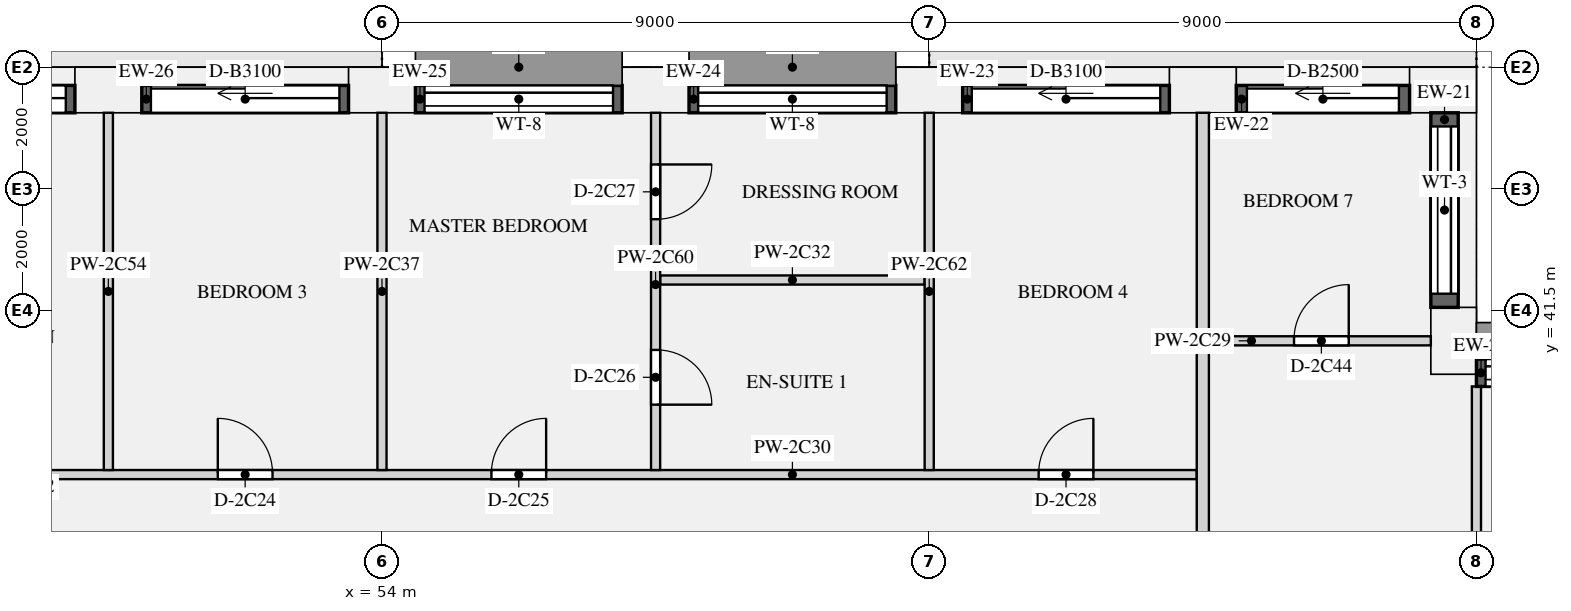
"""IFC4 building model, lengths in metres.
Left out: names, types, materials, properties, quantities, classifications, styles, units other than length and angle.
Written with IfcOpenShell. Run it as: python <this file> out.ifc"""

import sys

from ifc_helpers import new_model, si_unit, direction, frame, frame_2d, origin, origin_2d, place, context, subcontext, project, spatial, rectangle, extrude, element, fill, save


model = new_model("IFC4")
c1 = context("Model", 3, precision=1e-05, world=origin(), true_north=direction((0.0, 1.0)))
c2 = subcontext(c1, "Body", "Model", "MODEL_VIEW")
j1 = project(units=[si_unit("LENGTHUNIT", "METRE"), si_unit("PLANEANGLEUNIT", "RADIAN")], contexts=[c1])
p1 = place(None, origin())
s1 = spatial("IfcSite", under=j1, at=p1, CompositionType="ELEMENT")
p2 = place(p1, origin())
s2 = spatial("IfcBuilding", under=s1, at=p2, CompositionType="ELEMENT")
p3 = place(p2, frame((0.0, 0.0, 102.45)))
s3 = spatial("IfcBuildingStorey", under=s2, at=p3, CompositionType="ELEMENT", Elevation=102.45)
for number, where, z_axis, x_axis in (
    (1, (71.625, 41.0, 0.0), (0.0, 0.0, 1.0), (0.0, 1.0, 0.0)),
    (2, (71.45, 45.125, 0.0), (0.0, 0.0, 1.0), (-1.0, 0.0, 0.0)),
    (3, (67.5, 45.125, 0.0), (0.0, 0.0, 1.0), (-1.0, 0.0, 0.0)),
    (4, (63.0, 45.125, 0.0), (0.0, 0.0, 1.0), (-1.0, 0.0, 0.0)),
    (5, (58.5, 45.125, 0.0), (0.0, 0.0, 1.0), (-1.0, 0.0, 0.0)),
    (6, (54.0, 45.125, 0.0), (0.0, 0.0, 1.0), (-1.0, 0.0, 0.0)),
    (7, (49.5, 45.125, 0.0), (0.0, 0.0, 1.0), (-1.0, 0.0, 0.0)),
):
    element("IfcColumn", number, at=place(p3, frame(where, z_axis=z_axis, x_axis=x_axis)), inside=s3, PredefinedType="USERDEFINED", context=c2, shape_type="SweptSolid", body=[
        extrude(rectangle(XDim=1.1, YDim=0.75, at=origin_2d()), origin(), (0.0, 0.0, 1.0), 3.15),
    ])
p4 = place(p3, frame((75.4, 40.475, 0.9), z_axis=(0.0, 0.0, 1.0), x_axis=(-1.0, 0.0, 0.0)))
e8 = element("IfcWall", 8, at=p4, inside=s3, PredefinedType="SOLIDWALL", context=c2, shape_type="SweptSolid", body=[
    extrude(rectangle(XDim=3.4, YDim=0.45, at=frame_2d((1.7, 0.0))), origin(), (0.0, 0.0, 1.0), 1.93),
])
p5 = place(p4, frame((0.15, 0.0, 0.15)))
e9 = element("IfcOpeningElement", 9, at=p5, cuts=e8, PredefinedType="OPENING", context=c2, shape_type="SweptSolid", body=[
    extrude(rectangle(XDim=3.1, YDim=1.5, at=frame_2d((1.55, 0.75))), frame((0.0, 0.235, 0.0), z_axis=(0.0, -1.0, 0.0), x_axis=(1.0, 0.0, 0.0)), (0.0, 0.0, 1.0), 0.47),
])
p6 = place(p3, frame((71.475, 41.55, 0.9), z_axis=(0.0, 0.0, 1.0), x_axis=(0.0, 1.0, 0.0)))
e10 = element("IfcWall", 10, at=p6, inside=s3, PredefinedType="SOLIDWALL", context=c2, shape_type="SweptSolid", body=[
    extrude(rectangle(XDim=3.2, YDim=0.45, at=frame_2d((1.6, 0.0))), origin(), (0.0, 0.0, 1.0), 1.93),
])
p7 = place(p6, frame((0.225, 0.0, 0.15)))
e11 = element("IfcOpeningElement", 11, at=p7, cuts=e10, PredefinedType="OPENING", context=c2, shape_type="SweptSolid", body=[
    extrude(rectangle(XDim=2.75, YDim=1.5, at=frame_2d((1.375, 0.75))), frame((0.0, 0.235, 0.0), z_axis=(0.0, -1.0, 0.0), x_axis=(1.0, 0.0, 0.0)), (0.0, 0.0, 1.0), 0.47),
])
p8 = place(p3, frame((70.9, 44.975, 0.0), z_axis=(0.0, 0.0, 1.0), x_axis=(-1.0, 0.0, 0.0)))
e12 = element("IfcWall", 12, at=p8, inside=s3, PredefinedType="SOLIDWALL", context=c2, shape_type="SweptSolid", body=[
    extrude(rectangle(XDim=2.85, YDim=0.45, at=frame_2d((1.425, 0.0))), origin(), (0.0, 0.0, 1.0), 2.83),
])
p9 = place(p8, frame((0.175, 0.0, 0.0)))
e13 = element("IfcOpeningElement", 13, at=p9, cuts=e12, PredefinedType="OPENING", context=c2, shape_type="SweptSolid", body=[
    extrude(rectangle(XDim=2.5, YDim=2.3, at=frame_2d((1.25, 1.15))), frame((0.0, 0.235, 0.0), z_axis=(0.0, -1.0, 0.0), x_axis=(1.0, 0.0, 0.0)), (0.0, 0.0, 1.0), 0.47),
])
p10 = place(p3, frame((66.95, 44.975, 0.0), z_axis=(0.0, 0.0, 1.0), x_axis=(-1.0, 0.0, 0.0)))
e14 = element("IfcWall", 14, at=p10, inside=s3, PredefinedType="SOLIDWALL", context=c2, shape_type="SweptSolid", body=[
    extrude(rectangle(XDim=3.4, YDim=0.45, at=frame_2d((1.7, 0.0))), origin(), (0.0, 0.0, 1.0), 2.83),
])
p11 = place(p10, frame((0.15, 0.0, 0.0)))
e15 = element("IfcOpeningElement", 15, at=p11, cuts=e14, PredefinedType="OPENING", context=c2, shape_type="SweptSolid", body=[
    extrude(rectangle(XDim=3.1, YDim=2.3, at=frame_2d((1.55, 1.15))), frame((0.0, 0.235, 0.0), z_axis=(0.0, -1.0, 0.0), x_axis=(1.0, 0.0, 0.0)), (0.0, 0.0, 1.0), 0.47),
])
p12 = place(p3, frame((62.45, 44.975, 0.9), z_axis=(0.0, 0.0, 1.0), x_axis=(-1.0, 0.0, 0.0)))
e16 = element("IfcWall", 16, at=p12, inside=s3, PredefinedType="SOLIDWALL", context=c2, shape_type="SweptSolid", body=[
    extrude(rectangle(XDim=3.4, YDim=0.45, at=frame_2d((1.7, 0.0))), origin(), (0.0, 0.0, 1.0), 1.93),
])
p13 = place(p12, frame((0.15, 0.0, 0.15)))
e17 = element("IfcOpeningElement", 17, at=p13, cuts=e16, PredefinedType="OPENING", context=c2, shape_type="SweptSolid", body=[
    extrude(rectangle(XDim=3.1, YDim=1.5, at=frame_2d((1.55, 0.75))), frame((0.0, 0.235, 0.0), z_axis=(0.0, -1.0, 0.0), x_axis=(1.0, 0.0, 0.0)), (0.0, 0.0, 1.0), 0.47),
])
p14 = place(p3, frame((57.95, 44.975, 0.9), z_axis=(0.0, 0.0, 1.0), x_axis=(-1.0, 0.0, 0.0)))
e18 = element("IfcWall", 18, at=p14, inside=s3, PredefinedType="SOLIDWALL", context=c2, shape_type="SweptSolid", body=[
    extrude(rectangle(XDim=3.4, YDim=0.45, at=frame_2d((1.7, 0.0))), origin(), (0.0, 0.0, 1.0), 1.93),
])
p15 = place(p14, frame((0.15, 0.0, 0.15)))
e19 = element("IfcOpeningElement", 19, at=p15, cuts=e18, PredefinedType="OPENING", context=c2, shape_type="SweptSolid", body=[
    extrude(rectangle(XDim=3.1, YDim=1.5, at=frame_2d((1.55, 0.75))), frame((0.0, 0.235, 0.0), z_axis=(0.0, -1.0, 0.0), x_axis=(1.0, 0.0, 0.0)), (0.0, 0.0, 1.0), 0.47),
])
p16 = place(p3, frame((53.45, 44.975, 0.0), z_axis=(0.0, 0.0, 1.0), x_axis=(-1.0, 0.0, 0.0)))
e20 = element("IfcWall", 20, at=p16, inside=s3, PredefinedType="SOLIDWALL", context=c2, shape_type="SweptSolid", body=[
    extrude(rectangle(XDim=3.4, YDim=0.45, at=frame_2d((1.7, 0.0))), origin(), (0.0, 0.0, 1.0), 2.83),
])
p17 = place(p16, frame((0.15, 0.0, 0.0)))
e21 = element("IfcOpeningElement", 21, at=p17, cuts=e20, PredefinedType="OPENING", context=c2, shape_type="SweptSolid", body=[
    extrude(rectangle(XDim=3.1, YDim=2.3, at=frame_2d((1.55, 1.15))), frame((0.0, 0.235, 0.0), z_axis=(0.0, -1.0, 0.0), x_axis=(1.0, 0.0, 0.0)), (0.0, 0.0, 1.0), 0.47),
])
p18 = place(p3, frame((48.95, 44.975, 0.0), z_axis=(0.0, 0.0, 1.0), x_axis=(-1.0, 0.0, 0.0)))
e22 = element("IfcWall", 22, at=p18, inside=s3, PredefinedType="SOLIDWALL", context=c2, shape_type="SweptSolid", body=[
    extrude(rectangle(XDim=3.4, YDim=0.45, at=frame_2d((1.7, 0.0))), origin(), (0.0, 0.0, 1.0), 2.83),
])
p19 = place(p18, frame((0.15, 0.0, 0.0)))
e23 = element("IfcOpeningElement", 23, at=p19, cuts=e22, PredefinedType="OPENING", context=c2, shape_type="SweptSolid", body=[
    extrude(rectangle(XDim=3.1, YDim=2.3, at=frame_2d((1.55, 1.15))), frame((0.0, 0.235, 0.0), z_axis=(0.0, -1.0, 0.0), x_axis=(1.0, 0.0, 0.0)), (0.0, 0.0, 1.0), 0.47),
])
p20 = place(p3, frame((67.6, 41.0, 0.0), z_axis=(0.0, 0.0, 1.0), x_axis=(1.0, 0.0, 0.0)))
e24 = element("IfcWall", 24, at=p20, inside=s3, PredefinedType="PARTITIONING", context=c2, shape_type="SweptSolid", body=[
    extrude(rectangle(XDim=3.65, YDim=0.15, at=frame_2d((1.825, 0.0))), origin(), (0.0, 0.0, 1.0), 2.83),
])
p21 = place(p20, frame((1.4, 0.0, 0.0)))
e25 = element("IfcOpeningElement", 25, at=p21, cuts=e24, PredefinedType="OPENING", context=c2, shape_type="SweptSolid", body=[
    extrude(rectangle(XDim=0.9, YDim=2.1, at=frame_2d((0.45, 1.05))), frame((0.0, 0.085, 0.0), z_axis=(0.0, -1.0, 0.0), x_axis=(1.0, 0.0, 0.0)), (0.0, 0.0, 1.0), 0.17),
])
p22 = place(p3, frame((47.925, 38.8, 0.0), z_axis=(0.0, 0.0, 1.0), x_axis=(1.0, 0.0, 0.0)))
e26 = element("IfcWall", 26, at=p22, inside=s3, PredefinedType="PARTITIONING", context=c2, shape_type="SweptSolid", body=[
    extrude(rectangle(XDim=19.475, YDim=0.15, at=frame_2d((9.737, 0.0))), origin(), (0.0, 0.0, 1.0), 2.83),
])
p23 = place(p22, frame((3.375, 0.0, 0.0)))
e27 = element("IfcOpeningElement", 27, at=p23, cuts=e26, PredefinedType="OPENING", context=c2, shape_type="SweptSolid", body=[
    extrude(rectangle(XDim=0.9, YDim=2.1, at=frame_2d((0.45, 1.05))), frame((0.0, 0.085, 0.0), z_axis=(0.0, -1.0, 0.0), x_axis=(1.0, 0.0, 0.0)), (0.0, 0.0, 1.0), 0.17),
])
p24 = place(p22, frame((7.875, 0.0, 0.0)))
e28 = element("IfcOpeningElement", 28, at=p24, cuts=e26, PredefinedType="OPENING", context=c2, shape_type="SweptSolid", body=[
    extrude(rectangle(XDim=0.9, YDim=2.1, at=frame_2d((0.45, 1.05))), frame((0.0, 0.085, 0.0), z_axis=(0.0, -1.0, 0.0), x_axis=(1.0, 0.0, 0.0)), (0.0, 0.0, 1.0), 0.17),
])
p25 = place(p22, frame((16.875, 0.0, 0.0)))
e29 = element("IfcOpeningElement", 29, at=p25, cuts=e26, PredefinedType="OPENING", context=c2, shape_type="SweptSolid", body=[
    extrude(rectangle(XDim=0.9, YDim=2.1, at=frame_2d((0.45, 1.05))), frame((0.0, 0.085, 0.0), z_axis=(0.0, -1.0, 0.0), x_axis=(1.0, 0.0, 0.0)), (0.0, 0.0, 1.0), 0.17),
])
p26 = place(p3, frame((58.575, 42.0, 0.0), z_axis=(0.0, 0.0, 1.0), x_axis=(1.0, 0.0, 0.0)))
e30 = element("IfcWall", 30, at=p26, inside=s3, PredefinedType="PARTITIONING", context=c2, shape_type="SweptSolid", body=[
    extrude(rectangle(XDim=4.35, YDim=0.15, at=frame_2d((2.175, 0.0))), origin(), (0.0, 0.0, 1.0), 2.83),
])
for number, where, z_axis, x_axis in (
    (31, (54.0, 38.875, 0.0), (0.0, 0.0, 1.0), (0.0, 1.0, 0.0)),
    (32, (49.5, 38.875, 0.0), (0.0, 0.0, 1.0), (0.0, 1.0, 0.0)),
):
    element("IfcWall", number, at=place(p3, frame(where, z_axis=z_axis, x_axis=x_axis)), inside=s3, PredefinedType="PARTITIONING", context=c2, shape_type="SweptSolid", body=[
        extrude(rectangle(XDim=5.875, YDim=0.15, at=frame_2d((2.938, 0.0))), origin(), (0.0, 0.0, 1.0), 2.83),
    ])
p27 = place(p3, frame((67.5, 24.575, 0.0), z_axis=(0.0, 0.0, 1.0), x_axis=(0.0, 1.0, 0.0)))
e33 = element("IfcWall", 33, at=p27, inside=s3, PredefinedType="PARTITIONING", context=c2, shape_type="SweptSolid", body=[
    extrude(rectangle(XDim=20.175, YDim=0.2, at=frame_2d((10.087, 0.0))), origin(), (0.0, 0.0, 1.0), 2.83),
])
p28 = place(p3, frame((58.5, 38.875, 0.0), z_axis=(0.0, 0.0, 1.0), x_axis=(0.0, 1.0, 0.0)))
e34 = element("IfcWall", 34, at=p28, inside=s3, PredefinedType="PARTITIONING", context=c2, shape_type="SweptSolid", body=[
    extrude(rectangle(XDim=5.875, YDim=0.15, at=frame_2d((2.938, 0.0))), origin(), (0.0, 0.0, 1.0), 2.83),
])
p29 = place(p28, frame((1.075, 0.0, 0.0)))
e35 = element("IfcOpeningElement", 35, at=p29, cuts=e34, PredefinedType="OPENING", context=c2, shape_type="SweptSolid", body=[
    extrude(rectangle(XDim=0.9, YDim=2.1, at=frame_2d((0.45, 1.05))), frame((0.0, 0.085, 0.0), z_axis=(0.0, -1.0, 0.0), x_axis=(1.0, 0.0, 0.0)), (0.0, 0.0, 1.0), 0.17),
])
p30 = place(p28, frame((4.125, 0.0, 0.0)))
e36 = element("IfcOpeningElement", 36, at=p30, cuts=e34, PredefinedType="OPENING", context=c2, shape_type="SweptSolid", body=[
    extrude(rectangle(XDim=0.9, YDim=2.1, at=frame_2d((0.45, 1.05))), frame((0.0, 0.085, 0.0), z_axis=(0.0, -1.0, 0.0), x_axis=(1.0, 0.0, 0.0)), (0.0, 0.0, 1.0), 0.17),
])
p31 = place(p3, frame((63.0, 38.875, 0.0), z_axis=(0.0, 0.0, 1.0), x_axis=(0.0, 1.0, 0.0)))
e37 = element("IfcWall", 37, at=p31, inside=s3, PredefinedType="PARTITIONING", context=c2, shape_type="SweptSolid", body=[
    extrude(rectangle(XDim=5.875, YDim=0.15, at=frame_2d((2.938, 0.0))), origin(), (0.0, 0.0, 1.0), 2.83),
])
p32 = place(p3, frame((72.0, 24.575, 0.0), z_axis=(0.0, 0.0, 1.0), x_axis=(0.0, 1.0, 0.0)))
e38 = element("IfcWall", 38, at=p32, inside=s3, PredefinedType="PARTITIONING", context=c2, shape_type="SweptSolid", body=[
    extrude(rectangle(XDim=15.675, YDim=0.15, at=frame_2d((7.837, 0.0))), origin(), (0.0, 0.0, 1.0), 2.83),
])
p33 = place(p32, frame((6.65, 0.0, 0.0)))
e39 = element("IfcOpeningElement", 39, at=p33, cuts=e38, PredefinedType="OPENING", context=c2, shape_type="SweptSolid", body=[
    extrude(rectangle(XDim=0.9, YDim=2.1, at=frame_2d((0.45, 1.05))), frame((0.0, 0.085, 0.0), z_axis=(0.0, -1.0, 0.0), x_axis=(1.0, 0.0, 0.0)), (0.0, 0.0, 1.0), 0.17),
])
p34 = place(p5, origin())
e40 = element("IfcWindow", 40, at=p34, inside=s3, PartitioningType="SINGLE_PANEL", PredefinedType="WINDOW", context=c2, shape_type="SweptSolid", body=[
    extrude(rectangle(XDim=3.1, YDim=1.5, at=frame_2d((1.55, 0.75))), frame((0.0, -0.065, 0.0), z_axis=(0.0, -1.0, 0.0), x_axis=(1.0, 0.0, 0.0)), (0.0, 0.0, 1.0), 0.06),
])
fill(e9, e40)
p35 = place(p7, origin())
e41 = element("IfcWindow", 41, at=p35, inside=s3, PartitioningType="SINGLE_PANEL", PredefinedType="WINDOW", context=c2, shape_type="SweptSolid", body=[
    extrude(rectangle(XDim=2.75, YDim=1.5, at=frame_2d((1.375, 0.75))), frame((0.0, -0.065, 0.0), z_axis=(0.0, -1.0, 0.0), x_axis=(1.0, 0.0, 0.0)), (0.0, 0.0, 1.0), 0.06),
])
fill(e11, e41)
p36 = place(p9, origin())
e42 = element("IfcDoor", 42, at=p36, inside=s3, OperationType="SLIDING_TO_LEFT", PredefinedType="DOOR", context=c2, shape_type="SweptSolid", body=[
    extrude(rectangle(XDim=2.5, YDim=2.3, at=frame_2d((1.25, 1.15))), frame((0.0, -0.07, 0.0), z_axis=(0.0, -1.0, 0.0), x_axis=(1.0, 0.0, 0.0)), (0.0, 0.0, 1.0), 0.05),
])
fill(e13, e42)
p37 = place(p11, origin())
e43 = element("IfcDoor", 43, at=p37, inside=s3, OperationType="SLIDING_TO_LEFT", PredefinedType="DOOR", context=c2, shape_type="SweptSolid", body=[
    extrude(rectangle(XDim=3.1, YDim=2.3, at=frame_2d((1.55, 1.15))), frame((0.0, -0.07, 0.0), z_axis=(0.0, -1.0, 0.0), x_axis=(1.0, 0.0, 0.0)), (0.0, 0.0, 1.0), 0.05),
])
fill(e15, e43)
p38 = place(p13, origin())
e44 = element("IfcWindow", 44, at=p38, inside=s3, PartitioningType="SINGLE_PANEL", PredefinedType="WINDOW", context=c2, shape_type="SweptSolid", body=[
    extrude(rectangle(XDim=3.1, YDim=1.5, at=frame_2d((1.55, 0.75))), frame((0.0, -0.065, 0.0), z_axis=(0.0, -1.0, 0.0), x_axis=(1.0, 0.0, 0.0)), (0.0, 0.0, 1.0), 0.06),
])
fill(e17, e44)
p39 = place(p15, origin())
e45 = element("IfcWindow", 45, at=p39, inside=s3, PartitioningType="SINGLE_PANEL", PredefinedType="WINDOW", context=c2, shape_type="SweptSolid", body=[
    extrude(rectangle(XDim=3.1, YDim=1.5, at=frame_2d((1.55, 0.75))), frame((0.0, -0.065, 0.0), z_axis=(0.0, -1.0, 0.0), x_axis=(1.0, 0.0, 0.0)), (0.0, 0.0, 1.0), 0.06),
])
fill(e19, e45)
p40 = place(p17, origin())
e46 = element("IfcDoor", 46, at=p40, inside=s3, OperationType="SLIDING_TO_LEFT", PredefinedType="DOOR", context=c2, shape_type="SweptSolid", body=[
    extrude(rectangle(XDim=3.1, YDim=2.3, at=frame_2d((1.55, 1.15))), frame((0.0, -0.07, 0.0), z_axis=(0.0, -1.0, 0.0), x_axis=(1.0, 0.0, 0.0)), (0.0, 0.0, 1.0), 0.05),
])
fill(e21, e46)
p41 = place(p19, origin())
e47 = element("IfcDoor", 47, at=p41, inside=s3, OperationType="SLIDING_TO_LEFT", PredefinedType="DOOR", context=c2, shape_type="SweptSolid", body=[
    extrude(rectangle(XDim=3.1, YDim=2.3, at=frame_2d((1.55, 1.15))), frame((0.0, -0.07, 0.0), z_axis=(0.0, -1.0, 0.0), x_axis=(1.0, 0.0, 0.0)), (0.0, 0.0, 1.0), 0.05),
])
fill(e23, e47)
p42 = place(p23, origin())
e48 = element("IfcDoor", 48, at=p42, inside=s3, OperationType="SINGLE_SWING_LEFT", PredefinedType="DOOR", context=c2, shape_type="SweptSolid", body=[
    extrude(rectangle(XDim=0.9, YDim=2.1, at=frame_2d((0.45, 1.05))), frame((0.0, 0.025, 0.0), z_axis=(0.0, -1.0, 0.0), x_axis=(1.0, 0.0, 0.0)), (0.0, 0.0, 1.0), 0.05),
])
fill(e27, e48)
p43 = place(p24, origin())
e49 = element("IfcDoor", 49, at=p43, inside=s3, OperationType="SINGLE_SWING_RIGHT", PredefinedType="DOOR", context=c2, shape_type="SweptSolid", body=[
    extrude(rectangle(XDim=0.9, YDim=2.1, at=frame_2d((0.45, 1.05))), frame((0.0, 0.025, 0.0), z_axis=(0.0, -1.0, 0.0), x_axis=(1.0, 0.0, 0.0)), (0.0, 0.0, 1.0), 0.05),
])
fill(e28, e49)
p44 = place(p29, frame((0.9, 0.0, 0.0), z_axis=(0.0, 0.0, 1.0), x_axis=(-1.0, 0.0, 0.0)))
e50 = element("IfcDoor", 50, at=p44, inside=s3, OperationType="SINGLE_SWING_RIGHT", PredefinedType="DOOR", context=c2, shape_type="SweptSolid", body=[
    extrude(rectangle(XDim=0.9, YDim=2.1, at=frame_2d((0.45, 1.05))), frame((0.0, 0.025, 0.0), z_axis=(0.0, -1.0, 0.0), x_axis=(1.0, 0.0, 0.0)), (0.0, 0.0, 1.0), 0.05),
])
fill(e35, e50)
p45 = place(p30, frame((0.9, 0.0, 0.0), z_axis=(0.0, 0.0, 1.0), x_axis=(-1.0, 0.0, 0.0)))
e51 = element("IfcDoor", 51, at=p45, inside=s3, OperationType="SINGLE_SWING_LEFT", PredefinedType="DOOR", context=c2, shape_type="SweptSolid", body=[
    extrude(rectangle(XDim=0.9, YDim=2.1, at=frame_2d((0.45, 1.05))), frame((0.0, 0.025, 0.0), z_axis=(0.0, -1.0, 0.0), x_axis=(1.0, 0.0, 0.0)), (0.0, 0.0, 1.0), 0.05),
])
fill(e36, e51)
p46 = place(p25, origin())
e52 = element("IfcDoor", 52, at=p46, inside=s3, OperationType="SINGLE_SWING_RIGHT", PredefinedType="DOOR", context=c2, shape_type="SweptSolid", body=[
    extrude(rectangle(XDim=0.9, YDim=2.1, at=frame_2d((0.45, 1.05))), frame((0.0, 0.025, 0.0), z_axis=(0.0, -1.0, 0.0), x_axis=(1.0, 0.0, 0.0)), (0.0, 0.0, 1.0), 0.05),
])
fill(e29, e52)
p47 = place(p21, origin())
e53 = element("IfcDoor", 53, at=p47, inside=s3, OperationType="SINGLE_SWING_RIGHT", PredefinedType="DOOR", context=c2, shape_type="SweptSolid", body=[
    extrude(rectangle(XDim=0.9, YDim=2.1, at=frame_2d((0.45, 1.05))), frame((0.0, 0.025, 0.0), z_axis=(0.0, -1.0, 0.0), x_axis=(1.0, 0.0, 0.0)), (0.0, 0.0, 1.0), 0.05),
])
fill(e25, e53)
save(model, sys.argv[1])
